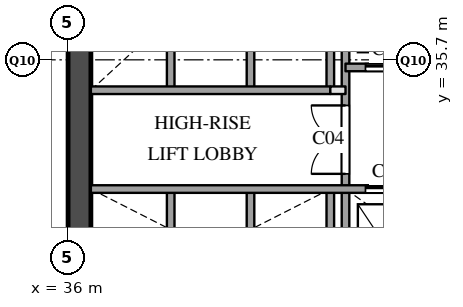
"""IFC4 building model, lengths in metres.
Left out: names, types, materials, properties, quantities, classifications, styles, units other than length and angle.
Written with IfcOpenShell. Run it as: python <this file> out.ifc"""

import sys

from ifc_helpers import new_model, si_unit, direction, frame, frame_2d, origin, place, context, subcontext, project, spatial, rectangle, extrude, element, fill, save


model = new_model("IFC4")
c1 = context("Model", 3, precision=1e-05, world=origin(), true_north=direction((0.0, 1.0)))
c2 = subcontext(c1, "Body", "Model", "MODEL_VIEW")
j1 = project(units=[si_unit("LENGTHUNIT", "METRE"), si_unit("PLANEANGLEUNIT", "RADIAN")], contexts=[c1])
p1 = place(None, origin())
s1 = spatial("IfcSite", under=j1, at=p1, CompositionType="ELEMENT")
p2 = place(p1, origin())
s2 = spatial("IfcBuilding", under=s1, at=p2, CompositionType="ELEMENT")
p3 = place(p2, frame((0.0, 0.0, 14.0)))
s3 = spatial("IfcBuildingStorey", under=s2, at=p3, CompositionType="ELEMENT", Elevation=14.0)
p4 = place(p3, frame((36.3, 29.1, 0.0), z_axis=(0.0, 0.0, 1.0), x_axis=(0.0, 1.0, 0.0)))
e1 = element("IfcWall", 1, at=p4, inside=s3, PredefinedType="SHEAR", context=c2, shape_type="SweptSolid", body=[
    extrude(rectangle(XDim=20.3, YDim=0.6, at=frame_2d((10.15, 0.0))), origin(), (0.0, 0.0, 1.0), 6.59),
])
p5 = place(p3, frame((38.7, 29.1, 0.0), z_axis=(0.0, 0.0, 1.0), x_axis=(0.0, 1.0, 0.0)))
e2 = element("IfcWall", 2, at=p5, inside=s3, PredefinedType="SOLIDWALL", context=c2, shape_type="SweptSolid", body=[
    extrude(rectangle(XDim=3.2, YDim=0.2, at=frame_2d((1.6, 0.0))), origin(), (0.0, 0.0, 1.0), 6.59),
])
p6 = place(p3, frame((38.7, 34.9, 0.0), z_axis=(0.0, 0.0, 1.0), x_axis=(0.0, 1.0, 0.0)))
e3 = element("IfcWall", 3, at=p6, inside=s3, PredefinedType="SOLIDWALL", context=c2, shape_type="SweptSolid", body=[
    extrude(rectangle(XDim=3.2, YDim=0.2, at=frame_2d((1.6, 0.0))), origin(), (0.0, 0.0, 1.0), 6.59),
])
p7 = place(p3, frame((40.8, 29.1, 0.0), z_axis=(0.0, 0.0, 1.0), x_axis=(0.0, 1.0, 0.0)))
e4 = element("IfcWall", 4, at=p7, inside=s3, PredefinedType="SOLIDWALL", context=c2, shape_type="SweptSolid", body=[
    extrude(rectangle(XDim=3.2, YDim=0.2, at=frame_2d((1.6, 0.0))), origin(), (0.0, 0.0, 1.0), 6.59),
])
p8 = place(p3, frame((40.8, 34.9, 0.0), z_axis=(0.0, 0.0, 1.0), x_axis=(0.0, 1.0, 0.0)))
e5 = element("IfcWall", 5, at=p8, inside=s3, PredefinedType="SOLIDWALL", context=c2, shape_type="SweptSolid", body=[
    extrude(rectangle(XDim=3.2, YDim=0.2, at=frame_2d((1.6, 0.0))), origin(), (0.0, 0.0, 1.0), 6.59),
])
p9 = place(p3, frame((42.9, 29.1, 0.0), z_axis=(0.0, 0.0, 1.0), x_axis=(0.0, 1.0, 0.0)))
e6 = element("IfcWall", 6, at=p9, inside=s3, PredefinedType="SOLIDWALL", context=c2, shape_type="SweptSolid", body=[
    extrude(rectangle(XDim=3.2, YDim=0.2, at=frame_2d((1.6, 0.0))), origin(), (0.0, 0.0, 1.0), 6.59),
])
p10 = place(p3, frame((42.9, 34.9, 0.0), z_axis=(0.0, 0.0, 1.0), x_axis=(0.0, 1.0, 0.0)))
e7 = element("IfcWall", 7, at=p10, inside=s3, PredefinedType="SOLIDWALL", context=c2, shape_type="SweptSolid", body=[
    extrude(rectangle(XDim=3.2, YDim=0.2, at=frame_2d((1.6, 0.0))), origin(), (0.0, 0.0, 1.0), 6.59),
])
p11 = place(p3, frame((43.3, 29.1, 0.0), z_axis=(0.0, 0.0, 1.0), x_axis=(0.0, 1.0, 0.0)))
e8 = element("IfcWall", 8, at=p11, inside=s3, PredefinedType="SOLIDWALL", context=c2, shape_type="SweptSolid", body=[
    extrude(rectangle(XDim=9.9, YDim=0.2, at=frame_2d((4.95, 0.0))), origin(), (0.0, 0.0, 1.0), 6.59),
])
p12 = place(p11, frame((3.6, 0.0, 0.0)))
e9 = element("IfcOpeningElement", 9, at=p12, cuts=e8, PredefinedType="OPENING", context=c2, shape_type="SweptSolid", body=[
    extrude(rectangle(XDim=1.8, YDim=2.1, at=frame_2d((0.9, 1.05))), frame((0.0, 0.11, 0.0), z_axis=(0.0, -1.0, 0.0), x_axis=(1.0, 0.0, 0.0)), (0.0, 0.0, 1.0), 0.22),
])
p13 = place(p3, frame((36.6, 32.3, 0.0), z_axis=(0.0, 0.0, 1.0), x_axis=(1.0, 0.0, 0.0)))
e10 = element("IfcWall", 10, at=p13, inside=s3, PredefinedType="SOLIDWALL", context=c2, shape_type="SweptSolid", body=[
    extrude(rectangle(XDim=11.2, YDim=0.2, at=frame_2d((5.6, 0.0))), origin(), (0.0, 0.0, 1.0), 6.59),
])
p14 = place(p13, frame((7.225, 0.0, 0.0)))
e11 = element("IfcOpeningElement", 11, at=p14, cuts=e10, PredefinedType="OPENING", context=c2, shape_type="SweptSolid", body=[
    extrude(rectangle(XDim=1.2, YDim=2.1, at=frame_2d((0.6, 1.05))), frame((0.0, 0.11, 0.0), z_axis=(0.0, -1.0, 0.0), x_axis=(1.0, 0.0, 0.0)), (0.0, 0.0, 1.0), 0.22),
])
p15 = place(p13, frame((9.475, 0.0, 0.0)))
e12 = element("IfcOpeningElement", 12, at=p15, cuts=e10, PredefinedType="OPENING", context=c2, shape_type="SweptSolid", body=[
    extrude(rectangle(XDim=1.2, YDim=2.1, at=frame_2d((0.6, 1.05))), frame((0.0, 0.11, 0.0), z_axis=(0.0, -1.0, 0.0), x_axis=(1.0, 0.0, 0.0)), (0.0, 0.0, 1.0), 0.22),
])
p16 = place(p3, frame((42.9, 34.9, 0.0), z_axis=(0.0, 0.0, 1.0), x_axis=(1.0, 0.0, 0.0)))
e13 = element("IfcWall", 13, at=p16, inside=s3, PredefinedType="PARTITIONING", context=c2, shape_type="SweptSolid", body=[
    extrude(rectangle(XDim=0.4, YDim=0.2, at=frame_2d((0.2, 0.0))), origin(), (0.0, 0.0, 1.0), 6.59),
])
p17 = place(p3, frame((36.6, 34.9, 0.0), z_axis=(0.0, 0.0, 1.0), x_axis=(1.0, 0.0, 0.0)))
e14 = element("IfcWall", 14, at=p17, inside=s3, PredefinedType="SOLIDWALL", context=c2, shape_type="SweptSolid", body=[
    extrude(rectangle(XDim=6.3, YDim=0.2, at=frame_2d((3.15, 0.0))), origin(), (0.0, 0.0, 1.0), 6.59),
])
p18 = place(p3, frame((43.3, 35.5, 0.0), z_axis=(0.0, 0.0, 1.0), x_axis=(1.0, 0.0, 0.0)))
e15 = element("IfcWall", 15, at=p18, inside=s3, PredefinedType="SOLIDWALL", context=c2, shape_type="SweptSolid", body=[
    extrude(rectangle(XDim=4.5, YDim=0.2, at=frame_2d((2.25, 0.0))), origin(), (0.0, 0.0, 1.0), 6.59),
])
p19 = place(p18, frame((0.525, 0.0, 0.0)))
e16 = element("IfcOpeningElement", 16, at=p19, cuts=e15, PredefinedType="OPENING", context=c2, shape_type="SweptSolid", body=[
    extrude(rectangle(XDim=1.2, YDim=2.1, at=frame_2d((0.6, 1.05))), frame((0.0, 0.11, 0.0), z_axis=(0.0, -1.0, 0.0), x_axis=(1.0, 0.0, 0.0)), (0.0, 0.0, 1.0), 0.22),
])
p20 = place(p18, frame((3.025, 0.0, 0.0)))
e17 = element("IfcOpeningElement", 17, at=p20, cuts=e15, PredefinedType="OPENING", context=c2, shape_type="SweptSolid", body=[
    extrude(rectangle(XDim=0.7, YDim=2.1, at=frame_2d((0.35, 1.05))), frame((0.0, 0.11, 0.0), z_axis=(0.0, -1.0, 0.0), x_axis=(1.0, 0.0, 0.0)), (0.0, 0.0, 1.0), 0.22),
])
p21 = place(p14, origin())
e18 = element("IfcDoor", 18, at=p21, inside=s3, OperationType="SLIDING_TO_LEFT", PredefinedType="DOOR", context=c2, shape_type="SweptSolid", body=[
    extrude(rectangle(XDim=1.2, YDim=2.1, at=frame_2d((0.6, 1.05))), frame((0.0, 0.025, 0.0), z_axis=(0.0, -1.0, 0.0), x_axis=(1.0, 0.0, 0.0)), (0.0, 0.0, 1.0), 0.05),
])
fill(e11, e18)
p22 = place(p19, origin())
e19 = element("IfcDoor", 19, at=p22, inside=s3, OperationType="SLIDING_TO_LEFT", PredefinedType="DOOR", context=c2, shape_type="SweptSolid", body=[
    extrude(rectangle(XDim=1.2, YDim=2.1, at=frame_2d((0.6, 1.05))), frame((0.0, 0.025, 0.0), z_axis=(0.0, -1.0, 0.0), x_axis=(1.0, 0.0, 0.0)), (0.0, 0.0, 1.0), 0.05),
])
fill(e16, e19)
p23 = place(p12, origin())
e20 = element("IfcDoor", 20, at=p23, inside=s3, OperationType="DOUBLE_DOOR_SINGLE_SWING", PredefinedType="DOOR", context=c2, shape_type="SweptSolid", body=[
    extrude(rectangle(XDim=1.8, YDim=2.1, at=frame_2d((0.9, 1.05))), frame((0.0, 0.025, 0.0), z_axis=(0.0, -1.0, 0.0), x_axis=(1.0, 0.0, 0.0)), (0.0, 0.0, 1.0), 0.05),
])
fill(e9, e20)
save(model, sys.argv[1])
